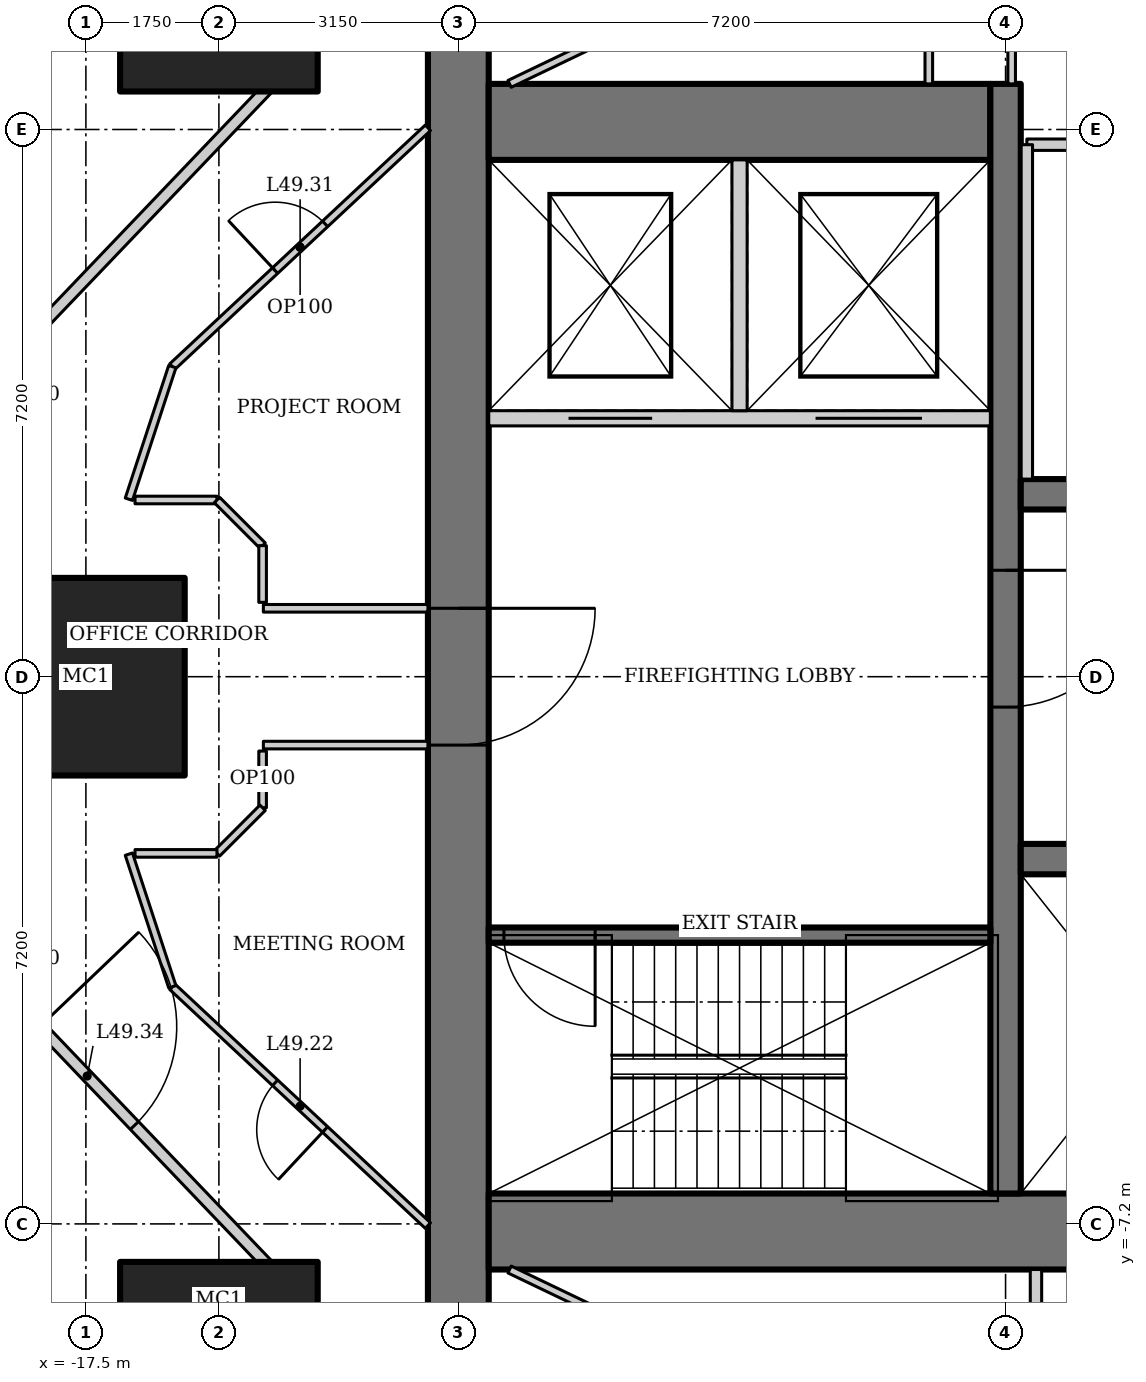
"""IFC4 building model, lengths in metres.
Left out: names, types, materials, properties, quantities, classifications, styles, units other than length and angle.
Written with IfcOpenShell. Run it as: python <this file> out.ifc"""

import sys

from ifc_helpers import new_model, si_unit, direction, frame, frame_2d, origin, origin_2d, place, context, subcontext, project, spatial, rectangle, hollow_rectangle, extrude, element, fill, save


model = new_model("IFC4")
c1 = context("Model", 3, precision=1e-05, world=origin(), true_north=direction((0.0, 1.0)))
c2 = subcontext(c1, "Body", "Model", "MODEL_VIEW")
j1 = project(units=[si_unit("LENGTHUNIT", "METRE"), si_unit("PLANEANGLEUNIT", "RADIAN")], contexts=[c1])
p1 = place(None, origin())
s1 = spatial("IfcSite", under=j1, at=p1, CompositionType="ELEMENT")
p2 = place(p1, origin())
s2 = spatial("IfcBuilding", under=s1, at=p2, CompositionType="ELEMENT")
p3 = place(p2, frame((0.0, 0.0, 211.6)))
s3 = spatial("IfcBuildingStorey", under=s2, at=p3, CompositionType="ELEMENT", Elevation=211.6)
for number, where, z_axis, x_axis in (
    (1, (-15.75, 9.0, 0.0), (0.0, 0.0, 1.0), (1.0, 0.0, 0.0)),
    (2, (-17.5, 0.0, 0.0), (0.0, 0.0, 1.0), (1.0, 0.0, 0.0)),
    (3, (-15.75, -9.0, 0.0), (0.0, 0.0, 1.0), (1.0, 0.0, 0.0)),
):
    element("IfcColumn", number, at=place(p3, frame(where, z_axis=z_axis, x_axis=x_axis)), inside=s3, PredefinedType="COLUMN", context=c2, shape_type="SweptSolid", body=[
        extrude(hollow_rectangle(XDim=2.6, YDim=2.6, WallThickness=0.13, at=origin_2d()), origin(), (0.0, 0.0, 1.0), 4.2),
    ])
p4 = place(p3, frame((-12.6, 13.0, 0.0), z_axis=(0.0, 0.0, 1.0), x_axis=(0.0, -1.0, 0.0)))
e4 = element("IfcWall", 4, at=p4, inside=s3, PredefinedType="SHEAR", context=c2, shape_type="SweptSolid", body=[
    extrude(rectangle(XDim=26.0, YDim=0.8, at=frame_2d((13.0, 0.0))), origin(), (0.0, 0.0, 1.0), 4.2),
])
p5 = place(p4, frame((12.1, 0.0, 0.0)))
e5 = element("IfcOpeningElement", 5, at=p5, cuts=e4, PredefinedType="OPENING", context=c2, shape_type="SweptSolid", body=[
    extrude(rectangle(XDim=1.8, YDim=2.1, at=frame_2d((0.9, 1.05))), frame((0.0, 0.41, 0.0), z_axis=(0.0, -1.0, 0.0), x_axis=(1.0, 0.0, 0.0)), (0.0, 0.0, 1.0), 0.82),
])
p6 = place(p3, frame((-12.2, -7.3, 0.0), z_axis=(0.0, 0.0, 1.0), x_axis=(1.0, 0.0, 0.0)))
e6 = element("IfcWall", 6, at=p6, inside=s3, PredefinedType="SHEAR", context=c2, shape_type="SweptSolid", body=[
    extrude(rectangle(XDim=24.4, YDim=1.0, at=frame_2d((12.2, 0.0))), origin(), (0.0, 0.0, 1.0), 4.2),
])
p7 = place(p3, frame((-5.6, 7.3, 0.0), z_axis=(0.0, 0.0, 1.0), x_axis=(-1.0, 0.0, 0.0)))
e7 = element("IfcWall", 7, at=p7, inside=s3, PredefinedType="SHEAR", context=c2, shape_type="SweptSolid", body=[
    extrude(rectangle(XDim=6.6, YDim=1.0, at=frame_2d((3.3, 0.0))), origin(), (0.0, 0.0, 1.0), 4.2),
])
p8 = place(p3, frame((-5.4, 7.8, 0.0), z_axis=(0.0, 0.0, 1.0), x_axis=(0.0, -1.0, 0.0)))
e8 = element("IfcWall", 8, at=p8, inside=s3, PredefinedType="SHEAR", context=c2, shape_type="SweptSolid", body=[
    extrude(rectangle(XDim=14.6, YDim=0.4, at=frame_2d((7.3, 0.0))), origin(), (0.0, 0.0, 1.0), 4.2),
])
p9 = place(p8, frame((6.4, 0.0, 0.0)))
e9 = element("IfcOpeningElement", 9, at=p9, cuts=e8, PredefinedType="OPENING", context=c2, shape_type="SweptSolid", body=[
    extrude(rectangle(XDim=1.8, YDim=2.1, at=frame_2d((0.9, 1.05))), frame((0.0, 0.21, 0.0), z_axis=(0.0, -1.0, 0.0), x_axis=(1.0, 0.0, 0.0)), (0.0, 0.0, 1.0), 0.42),
])
p10 = place(p3, frame((-5.2, -2.4, 0.0), z_axis=(0.0, 0.0, 1.0), x_axis=(1.0, 0.0, 0.0)))
e10 = element("IfcWall", 10, at=p10, inside=s3, PredefinedType="SHEAR", context=c2, shape_type="SweptSolid", body=[
    extrude(rectangle(XDim=10.4, YDim=0.4, at=frame_2d((5.2, 0.0))), origin(), (0.0, 0.0, 1.0), 4.2),
])
p11 = place(p10, frame((1.683, 0.0, 0.0)))
e11 = element("IfcOpeningElement", 11, at=p11, cuts=e10, PredefinedType="OPENING", context=c2, shape_type="SweptSolid", body=[
    extrude(rectangle(XDim=1.1, YDim=2.2, at=frame_2d((0.55, 1.1))), frame((0.0, 0.21, 0.0), z_axis=(0.0, -1.0, 0.0), x_axis=(1.0, 0.0, 0.0)), (0.0, 0.0, 1.0), 0.42),
])
p12 = place(p10, frame((5.217, 0.0, 0.0)))
e12 = element("IfcOpeningElement", 12, at=p12, cuts=e10, PredefinedType="OPENING", context=c2, shape_type="SweptSolid", body=[
    extrude(rectangle(XDim=1.1, YDim=2.2, at=frame_2d((0.55, 1.1))), frame((0.0, 0.21, 0.0), z_axis=(0.0, -1.0, 0.0), x_axis=(1.0, 0.0, 0.0)), (0.0, 0.0, 1.0), 0.42),
])
p13 = place(p10, frame((8.75, 0.0, 0.0)))
e13 = element("IfcOpeningElement", 13, at=p13, cuts=e10, PredefinedType="OPENING", context=c2, shape_type="SweptSolid", body=[
    extrude(rectangle(XDim=1.1, YDim=2.2, at=frame_2d((0.55, 1.1))), frame((0.0, 0.21, 0.0), z_axis=(0.0, -1.0, 0.0), x_axis=(1.0, 0.0, 0.0)), (0.0, 0.0, 1.0), 0.42),
])
p14 = place(p3, frame((5.2, 2.4, 0.0), z_axis=(0.0, 0.0, 1.0), x_axis=(-1.0, 0.0, 0.0)))
e14 = element("IfcWall", 14, at=p14, inside=s3, PredefinedType="SHEAR", context=c2, shape_type="SweptSolid", body=[
    extrude(rectangle(XDim=10.4, YDim=0.4, at=frame_2d((5.2, 0.0))), origin(), (0.0, 0.0, 1.0), 4.2),
])
p15 = place(p3, frame((-5.6, -3.4, 0.0), z_axis=(0.0, 0.0, 1.0), x_axis=(-1.0, 0.0, 0.0)))
e15 = element("IfcWall", 15, at=p15, inside=s3, PredefinedType="SHEAR", context=c2, shape_type="SweptSolid", body=[
    extrude(rectangle(XDim=6.6, YDim=0.2, at=frame_2d((3.3, 0.0))), origin(), (0.0, 0.0, 1.0), 4.2),
])
p16 = place(p15, frame((5.2, 0.0, 0.0)))
e16 = element("IfcOpeningElement", 16, at=p16, cuts=e15, PredefinedType="OPENING", context=c2, shape_type="SweptSolid", body=[
    extrude(rectangle(XDim=1.2, YDim=2.1, at=frame_2d((0.6, 1.05))), frame((0.0, 0.11, 0.0), z_axis=(0.0, -1.0, 0.0), x_axis=(1.0, 0.0, 0.0)), (0.0, 0.0, 1.0), 0.22),
])
p17 = place(p3, frame((-12.2, 3.4, 0.0), z_axis=(0.0, 0.0, 1.0), x_axis=(1.0, 0.0, 0.0)))
e17 = element("IfcWall", 17, at=p17, inside=s3, PredefinedType="SOLIDWALL", context=c2, shape_type="SweptSolid", body=[
    extrude(rectangle(XDim=6.6, YDim=0.2, at=frame_2d((3.3, 0.0))), origin(), (0.0, 0.0, 1.0), 4.2),
])
p18 = place(p17, frame((1.05, 0.0, 0.0)))
e18 = element("IfcOpeningElement", 18, at=p18, cuts=e17, PredefinedType="OPENING", context=c2, shape_type="SweptSolid", body=[
    extrude(rectangle(XDim=1.1, YDim=2.2, at=frame_2d((0.55, 1.1))), frame((0.0, 0.11, 0.0), z_axis=(0.0, -1.0, 0.0), x_axis=(1.0, 0.0, 0.0)), (0.0, 0.0, 1.0), 0.22),
])
p19 = place(p17, frame((4.3, 0.0, 0.0)))
e19 = element("IfcOpeningElement", 19, at=p19, cuts=e17, PredefinedType="OPENING", context=c2, shape_type="SweptSolid", body=[
    extrude(rectangle(XDim=1.4, YDim=2.2, at=frame_2d((0.7, 1.1))), frame((0.0, 0.11, 0.0), z_axis=(0.0, -1.0, 0.0), x_axis=(1.0, 0.0, 0.0)), (0.0, 0.0, 1.0), 0.22),
])
p20 = place(p3, frame((-8.9, 3.5, 0.0), z_axis=(0.0, 0.0, 1.0), x_axis=(0.0, 1.0, 0.0)))
e20 = element("IfcWall", 20, at=p20, inside=s3, PredefinedType="SOLIDWALL", context=c2, shape_type="SweptSolid", body=[
    extrude(rectangle(XDim=3.3, YDim=0.2, at=frame_2d((1.65, 0.0))), origin(), (0.0, 0.0, 1.0), 4.2),
])
p21 = place(p3, frame((-14.556, 8.318, 0.0), z_axis=(0.0, 0.0, 1.0), x_axis=(-0.690768413292, -0.723076067366, 0.0)))
e21 = element("IfcWall", 21, at=p21, inside=s3, PredefinedType="PARTITIONING", context=c2, shape_type="SweptSolid", body=[
    extrude(rectangle(XDim=5.237, YDim=0.15, at=frame_2d((2.618, 0.0))), origin(), (0.0, 0.0, 1.0), 4.05),
])
p22 = place(p3, frame((-18.174, -4.531, 0.0), z_axis=(0.0, 0.0, 1.0), x_axis=(0.690768413292, -0.723076067366, 0.0)))
e22 = element("IfcWall", 22, at=p22, inside=s3, PredefinedType="PARTITIONING", context=c2, shape_type="SweptSolid", body=[
    extrude(rectangle(XDim=5.237, YDim=0.15, at=frame_2d((2.618, 0.0))), origin(), (0.0, 0.0, 1.0), 4.05),
])
p23 = place(p22, frame((0.1, 0.0, 0.0)))
e23 = element("IfcOpeningElement", 23, at=p23, cuts=e22, PredefinedType="OPENING", context=c2, shape_type="SweptSolid", body=[
    extrude(rectangle(XDim=1.8, YDim=2.1, at=frame_2d((0.9, 1.05))), frame((0.0, 0.085, 0.0), z_axis=(0.0, -1.0, 0.0), x_axis=(1.0, 0.0, 0.0)), (0.0, 0.0, 1.0), 0.17),
])
p24 = place(p3, frame((-5.12, 7.0, 0.0), z_axis=(0.0, 0.0, 1.0), x_axis=(1.0, 0.0, 0.0)))
e24 = element("IfcWall", 24, at=p24, inside=s3, PredefinedType="SOLIDWALL", context=c2, shape_type="SweptSolid", body=[
    extrude(rectangle(XDim=10.24, YDim=0.15, at=frame_2d((5.12, 0.0))), origin(), (0.0, 0.0, 1.0), 4.05),
])
p25 = place(p24, frame((1.2, 0.0, 0.0)))
e25 = element("IfcOpeningElement", 25, at=p25, cuts=e24, PredefinedType="OPENING", context=c2, shape_type="SweptSolid", body=[
    extrude(rectangle(XDim=0.9, YDim=2.1, at=frame_2d((0.45, 1.05))), frame((0.0, 0.085, 0.0), z_axis=(0.0, -1.0, 0.0), x_axis=(1.0, 0.0, 0.0)), (0.0, 0.0, 1.0), 0.17),
])
p26 = place(p24, frame((4.477, 0.0, 0.0)))
e26 = element("IfcOpeningElement", 26, at=p26, cuts=e24, PredefinedType="OPENING", context=c2, shape_type="SweptSolid", body=[
    extrude(rectangle(XDim=0.9, YDim=2.1, at=frame_2d((0.45, 1.05))), frame((0.0, 0.085, 0.0), z_axis=(0.0, -1.0, 0.0), x_axis=(1.0, 0.0, 0.0)), (0.0, 0.0, 1.0), 0.17),
])
p27 = place(p24, frame((7.054, 0.0, 0.0)))
e27 = element("IfcOpeningElement", 27, at=p27, cuts=e24, PredefinedType="OPENING", context=c2, shape_type="SweptSolid", body=[
    extrude(rectangle(XDim=1.0, YDim=2.1, at=frame_2d((0.5, 1.05))), frame((0.0, 0.085, 0.0), z_axis=(0.0, -1.0, 0.0), x_axis=(1.0, 0.0, 0.0)), (0.0, 0.0, 1.0), 0.17),
])
p28 = place(p24, frame((8.952, 0.0, 0.0)))
e28 = element("IfcOpeningElement", 28, at=p28, cuts=e24, PredefinedType="OPENING", context=c2, shape_type="SweptSolid", body=[
    extrude(rectangle(XDim=0.9, YDim=2.1, at=frame_2d((0.45, 1.05))), frame((0.0, 0.085, 0.0), z_axis=(0.0, -1.0, 0.0), x_axis=(1.0, 0.0, 0.0)), (0.0, 0.0, 1.0), 0.17),
])
p29 = place(p3, frame((-5.12, 2.6, 0.0), z_axis=(0.0, 0.0, 1.0), x_axis=(0.0, 1.0, 0.0)))
e29 = element("IfcWall", 29, at=p29, inside=s3, PredefinedType="SOLIDWALL", context=c2, shape_type="SweptSolid", body=[
    extrude(rectangle(XDim=4.4, YDim=0.15, at=frame_2d((2.2, 0.0))), origin(), (0.0, 0.0, 1.0), 4.05),
])
p30 = place(p3, frame((-5.0, -7.8, 0.0), z_axis=(0.0, 0.0, 1.0), x_axis=(0.0, -1.0, 0.0)))
e30 = element("IfcWall", 30, at=p30, inside=s3, PredefinedType="SOLIDWALL", context=c2, shape_type="SweptSolid", body=[
    extrude(rectangle(XDim=2.682, YDim=0.15, at=frame_2d((1.341, 0.0))), origin(), (0.0, 0.0, 1.0), 4.05),
])
p31 = place(p3, frame((-13.0, -7.222, 0.0), z_axis=(0.0, 0.0, 1.0), x_axis=(-0.730651186567, 0.682750938167, 0.0)))
e31 = element("IfcWall", 31, at=p31, inside=s3, PredefinedType="PARTITIONING", context=c2, shape_type="SweptSolid", body=[
    extrude(rectangle(XDim=4.603, YDim=0.1, at=frame_2d((2.301, 0.0))), origin(), (0.0, 0.0, 1.0), 4.05),
])
p32 = place(p31, frame((1.851, 0.0, 0.0)))
e32 = element("IfcOpeningElement", 32, at=p32, cuts=e31, PredefinedType="OPENING", context=c2, shape_type="SweptSolid", body=[
    extrude(rectangle(XDim=0.9, YDim=2.1, at=frame_2d((0.45, 1.05))), frame((0.0, 0.06, 0.0), z_axis=(0.0, -1.0, 0.0), x_axis=(1.0, 0.0, 0.0)), (0.0, 0.0, 1.0), 0.12),
])
p33 = place(p3, frame((-8.924, -9.241, 0.0), z_axis=(0.0, 0.0, 1.0), x_axis=(-0.901553947207, 0.432666708073, 0.0)))
e33 = element("IfcWall", 33, at=p33, inside=s3, PredefinedType="PARTITIONING", context=c2, shape_type="SweptSolid", body=[
    extrude(rectangle(XDim=3.33, YDim=0.1, at=frame_2d((1.665, 0.0))), origin(), (0.0, 0.0, 1.0), 4.05),
])
p34 = place(p3, frame((-6.41, 9.907, 0.0), z_axis=(0.0, 0.0, 1.0), x_axis=(0.0, -1.0, 0.0)))
e34 = element("IfcWall", 34, at=p34, inside=s3, PredefinedType="PARTITIONING", context=c2, shape_type="SweptSolid", body=[
    extrude(rectangle(XDim=2.107, YDim=0.1, at=frame_2d((1.054, 0.0))), origin(), (0.0, 0.0, 1.0), 4.05),
])
p35 = place(p3, frame((-11.926, 7.8, 0.0), z_axis=(0.0, 0.0, 1.0), x_axis=(0.901553947207, 0.432666708073, 0.0)))
e35 = element("IfcWall", 35, at=p35, inside=s3, PredefinedType="PARTITIONING", context=c2, shape_type="SweptSolid", body=[
    extrude(rectangle(XDim=3.33, YDim=0.1, at=frame_2d((1.665, 0.0))), origin(), (0.0, 0.0, 1.0), 4.05),
])
p36 = place(p35, frame((1.215, 0.0, 0.0)))
e36 = element("IfcOpeningElement", 36, at=p36, cuts=e35, PredefinedType="OPENING", context=c2, shape_type="SweptSolid", body=[
    extrude(rectangle(XDim=0.9, YDim=2.1, at=frame_2d((0.45, 1.05))), frame((0.0, 0.06, 0.0), z_axis=(0.0, -1.0, 0.0), x_axis=(1.0, 0.0, 0.0)), (0.0, 0.0, 1.0), 0.12),
])
p37 = place(p3, frame((-5.32, 8.8, 0.0), z_axis=(0.0, 0.0, 1.0), x_axis=(0.0, -1.0, 0.0)))
e37 = element("IfcWall", 37, at=p37, inside=s3, PredefinedType="PARTITIONING", context=c2, shape_type="SweptSolid", body=[
    extrude(rectangle(XDim=1.0, YDim=0.1, at=frame_2d((0.5, 0.0))), origin(), (0.0, 0.0, 1.0), 4.05),
])
p38 = place(p3, frame((-16.363, 4.08, 0.0), z_axis=(0.0, 0.0, 1.0), x_axis=(0.730651186567, 0.682750938167, 0.0)))
e38 = element("IfcWall", 38, at=p38, inside=s3, PredefinedType="PARTITIONING", context=c2, shape_type="SweptSolid", body=[
    extrude(rectangle(XDim=4.603, YDim=0.1, at=frame_2d((2.301, 0.0))), origin(), (0.0, 0.0, 1.0), 4.05),
])
p39 = place(p38, frame((1.851, 0.0, 0.0)))
e39 = element("IfcOpeningElement", 39, at=p39, cuts=e38, PredefinedType="OPENING", context=c2, shape_type="SweptSolid", body=[
    extrude(rectangle(XDim=0.9, YDim=2.1, at=frame_2d((0.45, 1.05))), frame((0.0, 0.06, 0.0), z_axis=(0.0, -1.0, 0.0), x_axis=(1.0, 0.0, 0.0)), (0.0, 0.0, 1.0), 0.12),
])
p40 = place(p3, frame((-16.363, -4.08, 0.0), z_axis=(0.0, 0.0, 1.0), x_axis=(-0.311517212063, 0.950240509865, 0.0)))
e40 = element("IfcWall", 40, at=p40, inside=s3, PredefinedType="PARTITIONING", context=c2, shape_type="SweptSolid", body=[
    extrude(rectangle(XDim=1.836, YDim=0.1, at=frame_2d((0.918, 0.0))), origin(), (0.0, 0.0, 1.0), 4.05),
])
for number, where, z_axis, x_axis in (
    (41, (-15.165, -0.9, 0.0), (0.0, 0.0, 1.0), (1.0, 0.0, 0.0)),
    (42, (-13.0, 0.9, 0.0), (0.0, 0.0, 1.0), (-1.0, 0.0, 0.0)),
):
    element("IfcWall", number, at=place(p3, frame(where, z_axis=z_axis, x_axis=x_axis)), inside=s3, PredefinedType="PARTITIONING", context=c2, shape_type="SweptSolid", body=[
        extrude(rectangle(XDim=2.165, YDim=0.1, at=frame_2d((1.083, 0.0))), origin(), (0.0, 0.0, 1.0), 4.05),
    ])
p41 = place(p3, frame((-16.935, 2.335, 0.0), z_axis=(0.0, 0.0, 1.0), x_axis=(0.311517212063, 0.950240509865, 0.0)))
e43 = element("IfcWall", 43, at=p41, inside=s3, PredefinedType="PARTITIONING", context=c2, shape_type="SweptSolid", body=[
    extrude(rectangle(XDim=1.836, YDim=0.1, at=frame_2d((0.918, 0.0))), origin(), (0.0, 0.0, 1.0), 4.05),
])
p42 = place(p3, frame((-15.175, -0.978, 0.0), z_axis=(0.0, 0.0, 1.0), x_axis=(0.0, -1.0, 0.0)))
e44 = element("IfcWall", 44, at=p42, inside=s3, PredefinedType="PARTITIONING", context=c2, shape_type="SweptSolid", body=[
    extrude(rectangle(XDim=0.746, YDim=0.1, at=frame_2d((0.373, 0.0))), origin(), (0.0, 0.0, 1.0), 4.05),
])
p43 = place(p3, frame((-15.175, -1.725, 0.0), z_axis=(0.0, 0.0, 1.0), x_axis=(-0.707106781187, -0.707106781187, 0.0)))
e45 = element("IfcWall", 45, at=p43, inside=s3, PredefinedType="PARTITIONING", context=c2, shape_type="SweptSolid", body=[
    extrude(rectangle(XDim=0.849, YDim=0.1, at=frame_2d((0.425, 0.0))), origin(), (0.0, 0.0, 1.0), 4.05),
])
for number, where, z_axis, x_axis in (
    (46, (-15.775, -2.325, 0.0), (0.0, 0.0, 1.0), (-1.0, 0.0, 0.0)),
    (47, (-16.854, 2.325, 0.0), (0.0, 0.0, 1.0), (1.0, 0.0, 0.0)),
):
    element("IfcWall", number, at=place(p3, frame(where, z_axis=z_axis, x_axis=x_axis)), inside=s3, PredefinedType="PARTITIONING", context=c2, shape_type="SweptSolid", body=[
        extrude(rectangle(XDim=1.078, YDim=0.1, at=frame_2d((0.539, 0.0))), origin(), (0.0, 0.0, 1.0), 4.05),
    ])
p44 = place(p3, frame((-15.775, 2.325, 0.0), z_axis=(0.0, 0.0, 1.0), x_axis=(0.707106781187, -0.707106781187, 0.0)))
e48 = element("IfcWall", 48, at=p44, inside=s3, PredefinedType="PARTITIONING", context=c2, shape_type="SweptSolid", body=[
    extrude(rectangle(XDim=0.849, YDim=0.1, at=frame_2d((0.425, 0.0))), origin(), (0.0, 0.0, 1.0), 4.05),
])
p45 = place(p3, frame((-15.175, 1.725, 0.0), z_axis=(0.0, 0.0, 1.0), x_axis=(0.0, -1.0, 0.0)))
e49 = element("IfcWall", 49, at=p45, inside=s3, PredefinedType="PARTITIONING", context=c2, shape_type="SweptSolid", body=[
    extrude(rectangle(XDim=0.746, YDim=0.1, at=frame_2d((0.373, 0.0))), origin(), (0.0, 0.0, 1.0), 4.05),
])
p46 = place(p9, origin())
e50 = element("IfcDoor", 50, at=p46, inside=s3, OperationType="DOUBLE_DOOR_DOUBLE_SWING", PredefinedType="DOOR", context=c2, shape_type="SweptSolid", body=[
    extrude(rectangle(XDim=1.8, YDim=2.1, at=frame_2d((0.9, 1.05))), frame((0.0, 0.025, 0.0), z_axis=(0.0, -1.0, 0.0), x_axis=(1.0, 0.0, 0.0)), (0.0, 0.0, 1.0), 0.05),
])
fill(e9, e50)
p47 = place(p16, origin())
e51 = element("IfcDoor", 51, at=p47, inside=s3, OperationType="SINGLE_SWING_RIGHT", PredefinedType="DOOR", context=c2, shape_type="SweptSolid", body=[
    extrude(rectangle(XDim=1.2, YDim=2.1, at=frame_2d((0.6, 1.05))), frame((0.0, 0.025, 0.0), z_axis=(0.0, -1.0, 0.0), x_axis=(1.0, 0.0, 0.0)), (0.0, 0.0, 1.0), 0.05),
])
fill(e16, e51)
p48 = place(p5, origin())
e52 = element("IfcDoor", 52, at=p48, inside=s3, OperationType="DOUBLE_DOOR_DOUBLE_SWING", PredefinedType="DOOR", context=c2, shape_type="SweptSolid", body=[
    extrude(rectangle(XDim=1.8, YDim=2.1, at=frame_2d((0.9, 1.05))), frame((0.0, 0.025, 0.0), z_axis=(0.0, -1.0, 0.0), x_axis=(1.0, 0.0, 0.0)), (0.0, 0.0, 1.0), 0.05),
])
fill(e5, e52)
p49 = place(p18, origin())
e53 = element("IfcDoor", 53, at=p49, inside=s3, OperationType="DOUBLE_DOOR_SLIDING", PredefinedType="DOOR", context=c2, shape_type="SweptSolid", body=[
    extrude(rectangle(XDim=1.1, YDim=2.2, at=frame_2d((0.55, 1.1))), frame((0.0, 0.025, 0.0), z_axis=(0.0, -1.0, 0.0), x_axis=(1.0, 0.0, 0.0)), (0.0, 0.0, 1.0), 0.05),
])
fill(e18, e53)
p50 = place(p19, origin())
e54 = element("IfcDoor", 54, at=p50, inside=s3, OperationType="DOUBLE_DOOR_SLIDING", PredefinedType="DOOR", context=c2, shape_type="SweptSolid", body=[
    extrude(rectangle(XDim=1.4, YDim=2.2, at=frame_2d((0.7, 1.1))), frame((0.0, 0.025, 0.0), z_axis=(0.0, -1.0, 0.0), x_axis=(1.0, 0.0, 0.0)), (0.0, 0.0, 1.0), 0.05),
])
fill(e19, e54)
p51 = place(p32, origin())
e55 = element("IfcDoor", 55, at=p51, inside=s3, OperationType="SINGLE_SWING_LEFT", PredefinedType="DOOR", context=c2, shape_type="SweptSolid", body=[
    extrude(rectangle(XDim=0.9, YDim=2.1, at=frame_2d((0.45, 1.05))), frame((0.0, 0.025, 0.0), z_axis=(0.0, -1.0, 0.0), x_axis=(1.0, 0.0, 0.0)), (0.0, 0.0, 1.0), 0.05),
])
fill(e32, e55)
p52 = place(p39, origin())
e56 = element("IfcDoor", 56, at=p52, inside=s3, OperationType="SINGLE_SWING_LEFT", PredefinedType="DOOR", context=c2, shape_type="SweptSolid", body=[
    extrude(rectangle(XDim=0.9, YDim=2.1, at=frame_2d((0.45, 1.05))), frame((0.0, 0.025, 0.0), z_axis=(0.0, -1.0, 0.0), x_axis=(1.0, 0.0, 0.0)), (0.0, 0.0, 1.0), 0.05),
])
fill(e39, e56)
p53 = place(p23, origin())
e57 = element("IfcDoor", 57, at=p53, inside=s3, OperationType="DOUBLE_DOOR_DOUBLE_SWING", PredefinedType="DOOR", context=c2, shape_type="SweptSolid", body=[
    extrude(rectangle(XDim=1.8, YDim=2.1, at=frame_2d((0.9, 1.05))), frame((0.0, 0.025, 0.0), z_axis=(0.0, -1.0, 0.0), x_axis=(1.0, 0.0, 0.0)), (0.0, 0.0, 1.0), 0.05),
])
fill(e23, e57)
save(model, sys.argv[1])
